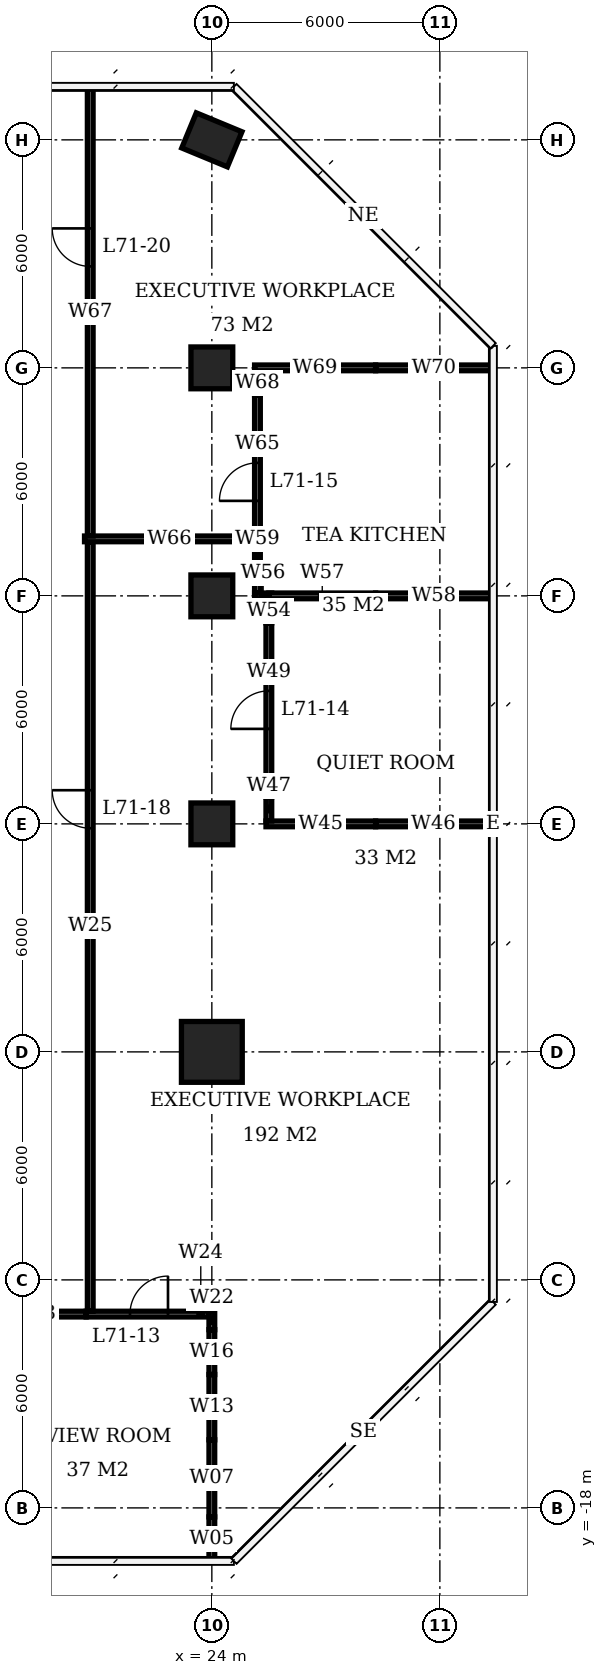
"""IFC4 building model, lengths in metres.
Left out: names, types, materials, properties, quantities, classifications, styles, units other than length and angle.
Written with IfcOpenShell. Run it as: python <this file> out.ifc"""

import sys

from ifc_helpers import new_model, si_unit, direction, frame, frame_2d, origin, origin_2d, place, context, subcontext, project, spatial, rectangle, extrude, element, fill, save


model = new_model("IFC4")
c1 = context("Model", 3, precision=1e-05, world=origin(), true_north=direction((0.0, 1.0)))
c2 = subcontext(c1, "Body", "Model", "MODEL_VIEW")
j1 = project(units=[si_unit("LENGTHUNIT", "METRE"), si_unit("PLANEANGLEUNIT", "RADIAN")], contexts=[c1])
p1 = place(None, origin())
s1 = spatial("IfcSite", under=j1, at=p1, CompositionType="ELEMENT")
p2 = place(p1, origin())
s2 = spatial("IfcBuilding", under=s1, at=p2, CompositionType="ELEMENT")
p3 = place(p2, frame((0.0, 0.0, 287.9)))
s3 = spatial("IfcBuildingStorey", under=s2, at=p3, CompositionType="ELEMENT", Elevation=287.9)
p4 = place(p3, frame((24.0, -6.0, 0.0), z_axis=(0.0, 0.0, 1.0), x_axis=(1.0, 0.0, 0.0)))
e1 = element("IfcColumn", 1, at=p4, inside=s3, PredefinedType="COLUMN", context=c2, shape_type="SweptSolid", body=[
    extrude(rectangle(XDim=1.6, YDim=1.6, at=origin_2d()), origin(), (0.0, 0.0, 1.0), 3.9),
])
for number, where, z_axis, x_axis in (
    (2, (24.0, 0.0, 0.0), (0.0, 0.0, 1.0), (1.0, 0.0, 0.0)),
    (3, (24.0, 6.0, 0.0), (0.0, 0.0, 1.0), (1.0, 0.0, 0.0)),
    (4, (24.0, 12.0, 0.0), (0.0, 0.0, 1.0), (1.0, 0.0, 0.0)),
):
    element("IfcColumn", number, at=place(p3, frame(where, z_axis=z_axis, x_axis=x_axis)), inside=s3, PredefinedType="COLUMN", context=c2, shape_type="SweptSolid", body=[
        extrude(rectangle(XDim=1.1, YDim=1.1, at=origin_2d()), origin(), (0.0, 0.0, 1.0), 3.9),
    ])
p5 = place(p3, frame((24.0, 18.0, 0.0), z_axis=(0.0, 0.0, 1.0), x_axis=(0.923879532511, -0.382683432365, 0.0)))
e5 = element("IfcColumn", 5, at=p5, inside=s3, PredefinedType="COLUMN", context=c2, shape_type="SweptSolid", body=[
    extrude(rectangle(XDim=1.3, YDim=1.0, at=origin_2d()), origin(), (0.0, 0.0, 1.0), 3.9),
])
p6 = place(p3, frame((17.925, -12.9, 0.0), z_axis=(0.0, 0.0, 1.0), x_axis=(1.0, 0.0, 0.0)))
e6 = element("IfcWall", 6, at=p6, inside=s3, PredefinedType="PARTITIONING", context=c2, shape_type="SweptSolid", body=[
    extrude(rectangle(XDim=2.767, YDim=0.15, at=frame_2d((1.384, 0.0))), origin(), (0.0, 0.0, 1.0), 2.65),
])
p7 = place(p3, frame((20.692, -12.9, 0.0), z_axis=(0.0, 0.0, 1.0), x_axis=(1.0, 0.0, 0.0)))
e7 = element("IfcWall", 7, at=p7, inside=s3, PredefinedType="PARTITIONING", context=c2, shape_type="SweptSolid", body=[
    extrude(rectangle(XDim=3.233, YDim=0.15, at=frame_2d((1.616, 0.0))), origin(), (0.0, 0.0, 1.0), 3.65),
])
p8 = place(p7, frame((1.154, 0.0, 0.0)))
e8 = element("IfcOpeningElement", 8, at=p8, cuts=e7, PredefinedType="OPENING", context=c2, shape_type="SweptSolid", body=[
    extrude(rectangle(XDim=1.0, YDim=2.4, at=frame_2d((0.5, 1.2))), frame((0.0, 0.085, 0.0), z_axis=(0.0, -1.0, 0.0), x_axis=(1.0, 0.0, 0.0)), (0.0, 0.0, 1.0), 0.17),
])
p9 = place(p3, frame((25.425, 0.0, 0.0), z_axis=(0.0, 0.0, 1.0), x_axis=(1.0, 0.0, 0.0)))
e9 = element("IfcWall", 9, at=p9, inside=s3, PredefinedType="PARTITIONING", context=c2, shape_type="SweptSolid", body=[
    extrude(rectangle(XDim=2.885, YDim=0.15, at=frame_2d((1.442, 0.0))), origin(), (0.0, 0.0, 1.0), 2.65),
])
p10 = place(p3, frame((28.31, 0.0, 0.0), z_axis=(0.0, 0.0, 1.0), x_axis=(1.0, 0.0, 0.0)))
e10 = element("IfcWall", 10, at=p10, inside=s3, PredefinedType="PARTITIONING", context=c2, shape_type="SweptSolid", body=[
    extrude(rectangle(XDim=3.04, YDim=0.15, at=frame_2d((1.52, 0.0))), origin(), (0.0, 0.0, 1.0), 3.65),
])
p11 = place(p3, frame((25.125, 6.0, 0.0), z_axis=(0.0, 0.0, 1.0), x_axis=(1.0, 0.0, 0.0)))
e11 = element("IfcWall", 11, at=p11, inside=s3, PredefinedType="PARTITIONING", context=c2, shape_type="SweptSolid", body=[
    extrude(rectangle(XDim=0.45, YDim=0.15, at=frame_2d((0.225, 0.0))), origin(), (0.0, 0.0, 1.0), 2.65),
])
p12 = place(p3, frame((25.5, 6.0, 0.0), z_axis=(0.0, 0.0, 1.0), x_axis=(1.0, 0.0, 0.0)))
e12 = element("IfcWall", 12, at=p12, inside=s3, PredefinedType="PARTITIONING", context=c2, shape_type="SweptSolid", body=[
    extrude(rectangle(XDim=2.81, YDim=0.15, at=frame_2d((1.405, 0.0))), origin(), (0.0, 0.0, 1.0), 2.65),
])
p13 = place(p3, frame((28.31, 6.0, 0.0), z_axis=(0.0, 0.0, 1.0), x_axis=(1.0, 0.0, 0.0)))
e13 = element("IfcWall", 13, at=p13, inside=s3, PredefinedType="PARTITIONING", context=c2, shape_type="SweptSolid", body=[
    extrude(rectangle(XDim=3.065, YDim=0.15, at=frame_2d((1.532, 0.0))), origin(), (0.0, 0.0, 1.0), 3.65),
])
p14 = place(p3, frame((25.125, 12.0, 0.0), z_axis=(0.0, 0.0, 1.0), x_axis=(1.0, 0.0, 0.0)))
e14 = element("IfcWall", 14, at=p14, inside=s3, PredefinedType="PARTITIONING", context=c2, shape_type="SweptSolid", body=[
    extrude(rectangle(XDim=3.185, YDim=0.15, at=frame_2d((1.593, 0.0))), origin(), (0.0, 0.0, 1.0), 2.65),
])
p15 = place(p3, frame((28.31, 12.0, 0.0), z_axis=(0.0, 0.0, 1.0), x_axis=(1.0, 0.0, 0.0)))
e15 = element("IfcWall", 15, at=p15, inside=s3, PredefinedType="PARTITIONING", context=c2, shape_type="SweptSolid", body=[
    extrude(rectangle(XDim=3.065, YDim=0.15, at=frame_2d((1.532, 0.0))), origin(), (0.0, 0.0, 1.0), 3.65),
])
p16 = place(p3, frame((24.0, -19.375, 0.0), z_axis=(0.0, 0.0, 1.0), x_axis=(0.0, 1.0, 0.0)))
e16 = element("IfcWall", 16, at=p16, inside=s3, PredefinedType="PARTITIONING", context=c2, shape_type="SweptSolid", body=[
    extrude(rectangle(XDim=1.138, YDim=0.15, at=frame_2d((0.569, 0.0))), origin(), (0.0, 0.0, 1.0), 3.65),
])
p17 = place(p3, frame((24.0, -18.237, 0.0), z_axis=(0.0, 0.0, 1.0), x_axis=(0.0, 1.0, 0.0)))
e17 = element("IfcWall", 17, at=p17, inside=s3, PredefinedType="PARTITIONING", context=c2, shape_type="SweptSolid", body=[
    extrude(rectangle(XDim=2.029, YDim=0.15, at=frame_2d((1.015, 0.0))), origin(), (0.0, 0.0, 1.0), 2.65),
])
p18 = place(p3, frame((24.0, -16.208, 0.0), z_axis=(0.0, 0.0, 1.0), x_axis=(0.0, 1.0, 0.0)))
e18 = element("IfcWall", 18, at=p18, inside=s3, PredefinedType="PARTITIONING", context=c2, shape_type="SweptSolid", body=[
    extrude(rectangle(XDim=1.718, YDim=0.15, at=frame_2d((0.859, 0.0))), origin(), (0.0, 0.0, 1.0), 3.65),
])
p19 = place(p3, frame((24.0, -14.49, 0.0), z_axis=(0.0, 0.0, 1.0), x_axis=(0.0, 1.0, 0.0)))
e19 = element("IfcWall", 19, at=p19, inside=s3, PredefinedType="PARTITIONING", context=c2, shape_type="SweptSolid", body=[
    extrude(rectangle(XDim=1.18, YDim=0.15, at=frame_2d((0.59, 0.0))), origin(), (0.0, 0.0, 1.0), 2.65),
])
p20 = place(p3, frame((24.0, -13.31, 0.0), z_axis=(0.0, 0.0, 1.0), x_axis=(0.0, 1.0, 0.0)))
e20 = element("IfcWall", 20, at=p20, inside=s3, PredefinedType="PARTITIONING", context=c2, shape_type="SweptSolid", body=[
    extrude(rectangle(XDim=0.485, YDim=0.15, at=frame_2d((0.243, 0.0))), origin(), (0.0, 0.0, 1.0), 3.65),
])
p21 = place(p3, frame((25.2, 6.075, 0.0), z_axis=(0.0, 0.0, 1.0), x_axis=(0.0, 1.0, 0.0)))
e21 = element("IfcWall", 21, at=p21, inside=s3, PredefinedType="PARTITIONING", context=c2, shape_type="SweptSolid", body=[
    extrude(rectangle(XDim=0.635, YDim=0.15, at=frame_2d((0.317, 0.0))), origin(), (0.0, 0.0, 1.0), 2.65),
])
p22 = place(p3, frame((25.2, 6.71, 0.0), z_axis=(0.0, 0.0, 1.0), x_axis=(0.0, 1.0, 0.0)))
e22 = element("IfcWall", 22, at=p22, inside=s3, PredefinedType="PARTITIONING", context=c2, shape_type="SweptSolid", body=[
    extrude(rectangle(XDim=4.58, YDim=0.15, at=frame_2d((2.29, 0.0))), origin(), (0.0, 0.0, 1.0), 3.65),
])
p23 = place(p22, frame((1.79, 0.0, 0.0)))
e23 = element("IfcOpeningElement", 23, at=p23, cuts=e22, PredefinedType="OPENING", context=c2, shape_type="SweptSolid", body=[
    extrude(rectangle(XDim=1.0, YDim=2.4, at=frame_2d((0.5, 1.2))), frame((0.0, 0.085, 0.0), z_axis=(0.0, -1.0, 0.0), x_axis=(1.0, 0.0, 0.0)), (0.0, 0.0, 1.0), 0.17),
])
for number, where, z_axis, x_axis in (
    (24, (25.2, 11.29, 0.0), (0.0, 0.0, 1.0), (0.0, 1.0, 0.0)),
    (25, (25.5, 0.075, 0.0), (0.0, 0.0, 1.0), (0.0, 1.0, 0.0)),
):
    element("IfcWall", number, at=place(p3, frame(where, z_axis=z_axis, x_axis=x_axis)), inside=s3, PredefinedType="PARTITIONING", context=c2, shape_type="SweptSolid", body=[
        extrude(rectangle(XDim=0.635, YDim=0.15, at=frame_2d((0.317, 0.0))), origin(), (0.0, 0.0, 1.0), 2.65),
    ])
p24 = place(p3, frame((25.5, 0.71, 0.0), z_axis=(0.0, 0.0, 1.0), x_axis=(0.0, 1.0, 0.0)))
e26 = element("IfcWall", 26, at=p24, inside=s3, PredefinedType="PARTITIONING", context=c2, shape_type="SweptSolid", body=[
    extrude(rectangle(XDim=4.58, YDim=0.15, at=frame_2d((2.29, 0.0))), origin(), (0.0, 0.0, 1.0), 3.65),
])
p25 = place(p24, frame((1.79, 0.0, 0.0)))
e27 = element("IfcOpeningElement", 27, at=p25, cuts=e26, PredefinedType="OPENING", context=c2, shape_type="SweptSolid", body=[
    extrude(rectangle(XDim=1.0, YDim=2.4, at=frame_2d((0.5, 1.2))), frame((0.0, 0.085, 0.0), z_axis=(0.0, -1.0, 0.0), x_axis=(1.0, 0.0, 0.0)), (0.0, 0.0, 1.0), 0.17),
])
p26 = place(p3, frame((25.5, 5.29, 0.0), z_axis=(0.0, 0.0, 1.0), x_axis=(0.0, 1.0, 0.0)))
e28 = element("IfcWall", 28, at=p26, inside=s3, PredefinedType="PARTITIONING", context=c2, shape_type="SweptSolid", body=[
    extrude(rectangle(XDim=0.635, YDim=0.15, at=frame_2d((0.317, 0.0))), origin(), (0.0, 0.0, 1.0), 2.65),
])
p27 = place(p3, frame((20.8, -12.825, 0.0), z_axis=(0.0, 0.0, 1.0), x_axis=(0.0, 1.0, 0.0)))
e29 = element("IfcWall", 29, at=p27, inside=s3, PredefinedType="PARTITIONING", context=c2, shape_type="SweptSolid", body=[
    extrude(rectangle(XDim=20.25, YDim=0.15, at=frame_2d((10.125, 0.0))), origin(), (0.0, 0.0, 1.0), 3.65),
])
p28 = place(p27, frame((12.711, 0.0, 0.0)))
e30 = element("IfcOpeningElement", 30, at=p28, cuts=e29, PredefinedType="OPENING", context=c2, shape_type="SweptSolid", body=[
    extrude(rectangle(XDim=1.0, YDim=2.4, at=frame_2d((0.5, 1.2))), frame((0.0, 0.085, 0.0), z_axis=(0.0, -1.0, 0.0), x_axis=(1.0, 0.0, 0.0)), (0.0, 0.0, 1.0), 0.17),
])
p29 = place(p3, frame((20.8, 7.575, 0.0), z_axis=(0.0, 0.0, 1.0), x_axis=(0.0, 1.0, 0.0)))
e31 = element("IfcWall", 31, at=p29, inside=s3, PredefinedType="PARTITIONING", context=c2, shape_type="SweptSolid", body=[
    extrude(rectangle(XDim=11.8, YDim=0.15, at=frame_2d((5.9, 0.0))), origin(), (0.0, 0.0, 1.0), 3.65),
])
p30 = place(p29, frame((7.095, 0.0, 0.0)))
e32 = element("IfcOpeningElement", 32, at=p30, cuts=e31, PredefinedType="OPENING", context=c2, shape_type="SweptSolid", body=[
    extrude(rectangle(XDim=1.0, YDim=2.4, at=frame_2d((0.5, 1.2))), frame((0.0, 0.085, 0.0), z_axis=(0.0, -1.0, 0.0), x_axis=(1.0, 0.0, 0.0)), (0.0, 0.0, 1.0), 0.17),
])
p31 = place(p3, frame((20.65, 7.5, 0.0), z_axis=(0.0, 0.0, 1.0), x_axis=(1.0, 0.0, 0.0)))
e33 = element("IfcWall", 33, at=p31, inside=s3, PredefinedType="PARTITIONING", context=c2, shape_type="SweptSolid", body=[
    extrude(rectangle(XDim=4.475, YDim=0.15, at=frame_2d((2.238, 0.0))), origin(), (0.0, 0.0, 1.0), 3.65),
])
p32 = place(p8, origin())
e34 = element("IfcDoor", 34, at=p32, inside=s3, OperationType="SINGLE_SWING_RIGHT", PredefinedType="DOOR", context=c2, shape_type="SweptSolid", body=[
    extrude(rectangle(XDim=1.0, YDim=2.4, at=frame_2d((0.5, 1.2))), frame((0.0, 0.025, 0.0), z_axis=(0.0, -1.0, 0.0), x_axis=(1.0, 0.0, 0.0)), (0.0, 0.0, 1.0), 0.05),
])
fill(e8, e34)
p33 = place(p25, origin())
e35 = element("IfcDoor", 35, at=p33, inside=s3, OperationType="SINGLE_SWING_LEFT", PredefinedType="DOOR", context=c2, shape_type="SweptSolid", body=[
    extrude(rectangle(XDim=1.0, YDim=2.4, at=frame_2d((0.5, 1.2))), frame((0.0, 0.025, 0.0), z_axis=(0.0, -1.0, 0.0), x_axis=(1.0, 0.0, 0.0)), (0.0, 0.0, 1.0), 0.05),
])
fill(e27, e35)
p34 = place(p23, origin())
e36 = element("IfcDoor", 36, at=p34, inside=s3, OperationType="SINGLE_SWING_LEFT", PredefinedType="DOOR", context=c2, shape_type="SweptSolid", body=[
    extrude(rectangle(XDim=1.0, YDim=2.4, at=frame_2d((0.5, 1.2))), frame((0.0, 0.025, 0.0), z_axis=(0.0, -1.0, 0.0), x_axis=(1.0, 0.0, 0.0)), (0.0, 0.0, 1.0), 0.05),
])
fill(e23, e36)
p35 = place(p28, origin())
e37 = element("IfcDoor", 37, at=p35, inside=s3, OperationType="SINGLE_SWING_RIGHT", PredefinedType="DOOR", context=c2, shape_type="SweptSolid", body=[
    extrude(rectangle(XDim=1.0, YDim=2.4, at=frame_2d((0.5, 1.2))), frame((0.0, 0.025, 0.0), z_axis=(0.0, -1.0, 0.0), x_axis=(1.0, 0.0, 0.0)), (0.0, 0.0, 1.0), 0.05),
])
fill(e30, e37)
p36 = place(p30, origin())
e38 = element("IfcDoor", 38, at=p36, inside=s3, OperationType="SINGLE_SWING_RIGHT", PredefinedType="DOOR", context=c2, shape_type="SweptSolid", body=[
    extrude(rectangle(XDim=1.0, YDim=2.4, at=frame_2d((0.5, 1.2))), frame((0.0, 0.025, 0.0), z_axis=(0.0, -1.0, 0.0), x_axis=(1.0, 0.0, 0.0)), (0.0, 0.0, 1.0), 0.05),
])
fill(e32, e38)
save(model, sys.argv[1])
